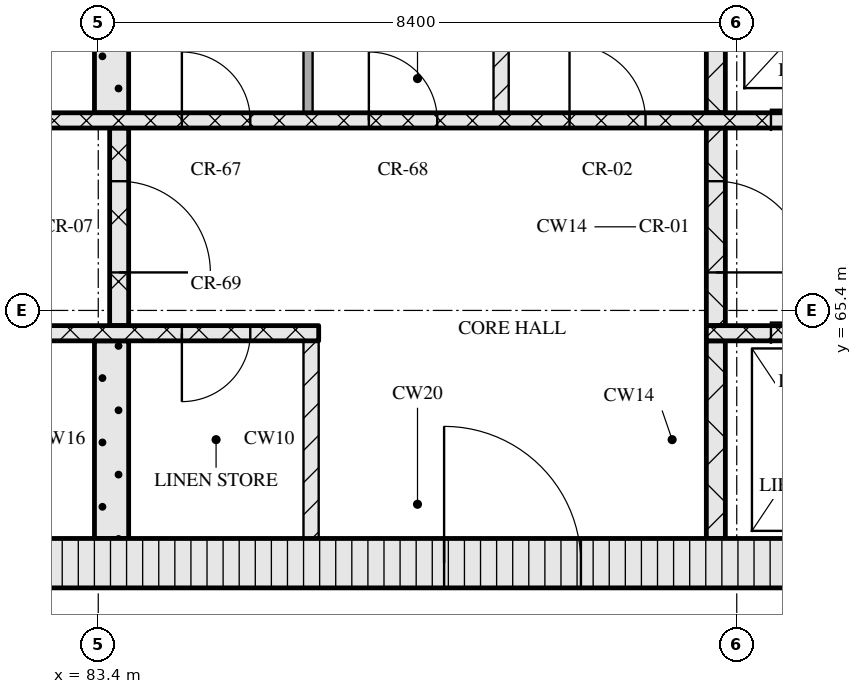
"""IFC4 building model, lengths in metres.
Left out: names, types, materials, properties, quantities, classifications, styles, units other than length and angle.
Written with IfcOpenShell. Run it as: python <this file> out.ifc"""

import sys

from ifc_helpers import new_model, si_unit, direction, frame, frame_2d, origin, place, context, subcontext, project, spatial, rectangle, extrude, element, fill, save


model = new_model("IFC4")
c1 = context("Model", 3, precision=1e-05, world=origin(), true_north=direction((0.0, 1.0)))
c2 = subcontext(c1, "Body", "Model", "MODEL_VIEW")
j1 = project(units=[si_unit("LENGTHUNIT", "METRE"), si_unit("PLANEANGLEUNIT", "RADIAN")], contexts=[c1])
p1 = place(None, origin())
s1 = spatial("IfcSite", under=j1, at=p1, CompositionType="ELEMENT")
p2 = place(p1, origin())
s2 = spatial("IfcBuilding", under=s1, at=p2, CompositionType="ELEMENT")
p3 = place(p2, frame((0.0, 0.0, 245.1)))
s3 = spatial("IfcBuildingStorey", under=s2, at=p3, CompositionType="ELEMENT", Elevation=245.1)
p4 = place(p3, frame((67.15, 62.075, 0.0), z_axis=(0.0, 0.0, 1.0), x_axis=(1.0, 0.0, 0.0)))
e1 = element("IfcWall", 1, at=p4, inside=s3, PredefinedType="SOLIDWALL", context=c2, shape_type="SweptSolid", body=[
    extrude(rectangle(XDim=40.9, YDim=0.65, at=frame_2d((20.45, 0.0))), origin(), (0.0, 0.0, 1.0), 3.32),
])
p5 = place(p4, frame((20.8, 0.0, 0.0)))
e2 = element("IfcOpeningElement", 2, at=p5, cuts=e1, PredefinedType="OPENING", context=c2, shape_type="SweptSolid", body=[
    extrude(rectangle(XDim=1.8, YDim=2.1, at=frame_2d((0.9, 1.05))), frame((0.0, 0.335, 0.0), z_axis=(0.0, -1.0, 0.0), x_axis=(1.0, 0.0, 0.0)), (0.0, 0.0, 1.0), 0.67),
])
p6 = place(p3, frame((83.575, 62.4, 0.0), z_axis=(0.0, 0.0, 1.0), x_axis=(0.0, 1.0, 0.0)))
e3 = element("IfcWall", 3, at=p6, inside=s3, PredefinedType="SOLIDWALL", context=c2, shape_type="SweptSolid", body=[
    extrude(rectangle(XDim=2.6, YDim=0.45, at=frame_2d((1.3, 0.0))), origin(), (0.0, 0.0, 1.0), 3.32),
])
p7 = place(p3, frame((86.2, 62.4, 0.0), z_axis=(0.0, 0.0, 1.0), x_axis=(0.0, 1.0, 0.0)))
e4 = element("IfcWall", 4, at=p7, inside=s3, PredefinedType="PARTITIONING", context=c2, shape_type="SweptSolid", body=[
    extrude(rectangle(XDim=2.6, YDim=0.2, at=frame_2d((1.3, 0.0))), origin(), (0.0, 0.0, 1.0), 3.32),
])
p8 = place(p3, frame((91.525, 62.4, 0.0), z_axis=(0.0, 0.0, 1.0), x_axis=(0.0, 1.0, 0.0)))
e5 = element("IfcWall", 5, at=p8, inside=s3, PredefinedType="SOLIDWALL", context=c2, shape_type="SweptSolid", body=[
    extrude(rectangle(XDim=2.6, YDim=0.25, at=frame_2d((1.3, 0.0))), origin(), (0.0, 0.0, 1.0), 3.32),
])
p9 = place(p3, frame((67.8, 65.1, 0.0), z_axis=(0.0, 0.0, 1.0), x_axis=(1.0, 0.0, 0.0)))
e6 = element("IfcWall", 6, at=p9, inside=s3, PredefinedType="SOLIDWALL", context=c2, shape_type="SweptSolid", body=[
    extrude(rectangle(XDim=18.5, YDim=0.2, at=frame_2d((9.25, 0.0))), origin(), (0.0, 0.0, 1.0), 3.32),
])
p10 = place(p9, frame((7.27, 0.0, 0.0)))
e7 = element("IfcOpeningElement", 7, at=p10, cuts=e6, PredefinedType="OPENING", context=c2, shape_type="SweptSolid", body=[
    extrude(rectangle(XDim=0.9, YDim=2.1, at=frame_2d((0.45, 1.05))), frame((0.0, 0.11, 0.0), z_axis=(0.0, -1.0, 0.0), x_axis=(1.0, 0.0, 0.0)), (0.0, 0.0, 1.0), 0.22),
])
p11 = place(p9, frame((9.65, 0.0, 0.0)))
e8 = element("IfcOpeningElement", 8, at=p11, cuts=e6, PredefinedType="OPENING", context=c2, shape_type="SweptSolid", body=[
    extrude(rectangle(XDim=0.9, YDim=2.1, at=frame_2d((0.45, 1.05))), frame((0.0, 0.11, 0.0), z_axis=(0.0, -1.0, 0.0), x_axis=(1.0, 0.0, 0.0)), (0.0, 0.0, 1.0), 0.22),
])
p12 = place(p9, frame((13.36, 0.0, 0.0)))
e9 = element("IfcOpeningElement", 9, at=p12, cuts=e6, PredefinedType="OPENING", context=c2, shape_type="SweptSolid", body=[
    extrude(rectangle(XDim=0.9, YDim=2.1, at=frame_2d((0.45, 1.05))), frame((0.0, 0.11, 0.0), z_axis=(0.0, -1.0, 0.0), x_axis=(1.0, 0.0, 0.0)), (0.0, 0.0, 1.0), 0.22),
])
p13 = place(p9, frame((16.7, 0.0, 0.0)))
e10 = element("IfcOpeningElement", 10, at=p13, cuts=e6, PredefinedType="OPENING", context=c2, shape_type="SweptSolid", body=[
    extrude(rectangle(XDim=0.9, YDim=2.1, at=frame_2d((0.45, 1.05))), frame((0.0, 0.11, 0.0), z_axis=(0.0, -1.0, 0.0), x_axis=(1.0, 0.0, 0.0)), (0.0, 0.0, 1.0), 0.22),
])
p14 = place(p3, frame((91.4, 65.1, 0.0), z_axis=(0.0, 0.0, 1.0), x_axis=(1.0, 0.0, 0.0)))
e11 = element("IfcWall", 11, at=p14, inside=s3, PredefinedType="SOLIDWALL", context=c2, shape_type="SweptSolid", body=[
    extrude(rectangle(XDim=16.0, YDim=0.2, at=frame_2d((8.0, 0.0))), origin(), (0.0, 0.0, 1.0), 3.32),
])
p15 = place(p14, frame((0.85, 0.0, 0.0)))
e12 = element("IfcOpeningElement", 12, at=p15, cuts=e11, PredefinedType="OPENING", context=c2, shape_type="SweptSolid", body=[
    extrude(rectangle(XDim=1.1, YDim=2.1, at=frame_2d((0.55, 1.05))), frame((0.0, 0.11, 0.0), z_axis=(0.0, -1.0, 0.0), x_axis=(1.0, 0.0, 0.0)), (0.0, 0.0, 1.0), 0.22),
])
p16 = place(p14, frame((3.35, 0.0, 0.0)))
e13 = element("IfcOpeningElement", 13, at=p16, cuts=e11, PredefinedType="OPENING", context=c2, shape_type="SweptSolid", body=[
    extrude(rectangle(XDim=1.1, YDim=2.1, at=frame_2d((0.55, 1.05))), frame((0.0, 0.11, 0.0), z_axis=(0.0, -1.0, 0.0), x_axis=(1.0, 0.0, 0.0)), (0.0, 0.0, 1.0), 0.22),
])
p17 = place(p14, frame((5.85, 0.0, 0.0)))
e14 = element("IfcOpeningElement", 14, at=p17, cuts=e11, PredefinedType="OPENING", context=c2, shape_type="SweptSolid", body=[
    extrude(rectangle(XDim=1.1, YDim=2.1, at=frame_2d((0.55, 1.05))), frame((0.0, 0.11, 0.0), z_axis=(0.0, -1.0, 0.0), x_axis=(1.0, 0.0, 0.0)), (0.0, 0.0, 1.0), 0.22),
])
p18 = place(p14, frame((7.83, 0.0, 0.0)))
e15 = element("IfcOpeningElement", 15, at=p18, cuts=e11, PredefinedType="OPENING", context=c2, shape_type="SweptSolid", body=[
    extrude(rectangle(XDim=0.9, YDim=2.1, at=frame_2d((0.45, 1.05))), frame((0.0, 0.11, 0.0), z_axis=(0.0, -1.0, 0.0), x_axis=(1.0, 0.0, 0.0)), (0.0, 0.0, 1.0), 0.22),
])
p19 = place(p3, frame((83.675, 65.2, 0.0), z_axis=(0.0, 0.0, 1.0), x_axis=(0.0, 1.0, 0.0)))
e16 = element("IfcWall", 16, at=p19, inside=s3, PredefinedType="SOLIDWALL", context=c2, shape_type="SweptSolid", body=[
    extrude(rectangle(XDim=2.6, YDim=0.25, at=frame_2d((1.3, 0.0))), origin(), (0.0, 0.0, 1.0), 3.32),
])
p20 = place(p19, frame((0.7, 0.0, 0.0)))
e17 = element("IfcOpeningElement", 17, at=p20, cuts=e16, PredefinedType="OPENING", context=c2, shape_type="SweptSolid", body=[
    extrude(rectangle(XDim=1.2, YDim=2.1, at=frame_2d((0.6, 1.05))), frame((0.0, 0.135, 0.0), z_axis=(0.0, -1.0, 0.0), x_axis=(1.0, 0.0, 0.0)), (0.0, 0.0, 1.0), 0.27),
])
p21 = place(p3, frame((91.525, 65.2, 0.0), z_axis=(0.0, 0.0, 1.0), x_axis=(0.0, 1.0, 0.0)))
e18 = element("IfcWall", 18, at=p21, inside=s3, PredefinedType="SOLIDWALL", context=c2, shape_type="SweptSolid", body=[
    extrude(rectangle(XDim=2.6, YDim=0.25, at=frame_2d((1.3, 0.0))), origin(), (0.0, 0.0, 1.0), 3.32),
])
p22 = place(p21, frame((0.7, 0.0, 0.0)))
e19 = element("IfcOpeningElement", 19, at=p22, cuts=e18, PredefinedType="OPENING", context=c2, shape_type="SweptSolid", body=[
    extrude(rectangle(XDim=1.2, YDim=2.1, at=frame_2d((0.6, 1.05))), frame((0.0, 0.135, 0.0), z_axis=(0.0, -1.0, 0.0), x_axis=(1.0, 0.0, 0.0)), (0.0, 0.0, 1.0), 0.27),
])
p23 = place(p3, frame((76.05, 67.9, 0.0), z_axis=(0.0, 0.0, 1.0), x_axis=(1.0, 0.0, 0.0)))
e20 = element("IfcWall", 20, at=p23, inside=s3, PredefinedType="SOLIDWALL", context=c2, shape_type="SweptSolid", body=[
    extrude(rectangle(XDim=23.1, YDim=0.2, at=frame_2d((11.55, 0.0))), origin(), (0.0, 0.0, 1.0), 3.32),
])
p24 = place(p23, frame((0.75, 0.0, 0.0)))
e21 = element("IfcOpeningElement", 21, at=p24, cuts=e20, PredefinedType="OPENING", context=c2, shape_type="SweptSolid", body=[
    extrude(rectangle(XDim=0.9, YDim=2.1, at=frame_2d((0.45, 1.05))), frame((0.0, 0.11, 0.0), z_axis=(0.0, -1.0, 0.0), x_axis=(1.0, 0.0, 0.0)), (0.0, 0.0, 1.0), 0.22),
])
p25 = place(p23, frame((3.32, 0.0, 0.0)))
e22 = element("IfcOpeningElement", 22, at=p25, cuts=e20, PredefinedType="OPENING", context=c2, shape_type="SweptSolid", body=[
    extrude(rectangle(XDim=0.9, YDim=2.1, at=frame_2d((0.45, 1.05))), frame((0.0, 0.11, 0.0), z_axis=(0.0, -1.0, 0.0), x_axis=(1.0, 0.0, 0.0)), (0.0, 0.0, 1.0), 0.22),
])
p26 = place(p23, frame((5.77, 0.0, 0.0)))
e23 = element("IfcOpeningElement", 23, at=p26, cuts=e20, PredefinedType="OPENING", context=c2, shape_type="SweptSolid", body=[
    extrude(rectangle(XDim=0.9, YDim=2.1, at=frame_2d((0.45, 1.05))), frame((0.0, 0.11, 0.0), z_axis=(0.0, -1.0, 0.0), x_axis=(1.0, 0.0, 0.0)), (0.0, 0.0, 1.0), 0.22),
])
p27 = place(p23, frame((8.45, 0.0, 0.0)))
e24 = element("IfcOpeningElement", 24, at=p27, cuts=e20, PredefinedType="OPENING", context=c2, shape_type="SweptSolid", body=[
    extrude(rectangle(XDim=0.9, YDim=2.1, at=frame_2d((0.45, 1.05))), frame((0.0, 0.11, 0.0), z_axis=(0.0, -1.0, 0.0), x_axis=(1.0, 0.0, 0.0)), (0.0, 0.0, 1.0), 0.22),
])
p28 = place(p23, frame((10.91, 0.0, 0.0)))
e25 = element("IfcOpeningElement", 25, at=p28, cuts=e20, PredefinedType="OPENING", context=c2, shape_type="SweptSolid", body=[
    extrude(rectangle(XDim=0.9, YDim=2.1, at=frame_2d((0.45, 1.05))), frame((0.0, 0.11, 0.0), z_axis=(0.0, -1.0, 0.0), x_axis=(1.0, 0.0, 0.0)), (0.0, 0.0, 1.0), 0.22),
])
p29 = place(p23, frame((13.55, 0.0, 0.0)))
e26 = element("IfcOpeningElement", 26, at=p29, cuts=e20, PredefinedType="OPENING", context=c2, shape_type="SweptSolid", body=[
    extrude(rectangle(XDim=1.0, YDim=2.1, at=frame_2d((0.5, 1.05))), frame((0.0, 0.11, 0.0), z_axis=(0.0, -1.0, 0.0), x_axis=(1.0, 0.0, 0.0)), (0.0, 0.0, 1.0), 0.22),
])
p30 = place(p23, frame((16.2, 0.0, 0.0)))
e27 = element("IfcOpeningElement", 27, at=p30, cuts=e20, PredefinedType="OPENING", context=c2, shape_type="SweptSolid", body=[
    extrude(rectangle(XDim=1.1, YDim=2.1, at=frame_2d((0.55, 1.05))), frame((0.0, 0.11, 0.0), z_axis=(0.0, -1.0, 0.0), x_axis=(1.0, 0.0, 0.0)), (0.0, 0.0, 1.0), 0.22),
])
p31 = place(p23, frame((18.7, 0.0, 0.0)))
e28 = element("IfcOpeningElement", 28, at=p31, cuts=e20, PredefinedType="OPENING", context=c2, shape_type="SweptSolid", body=[
    extrude(rectangle(XDim=1.1, YDim=2.1, at=frame_2d((0.55, 1.05))), frame((0.0, 0.11, 0.0), z_axis=(0.0, -1.0, 0.0), x_axis=(1.0, 0.0, 0.0)), (0.0, 0.0, 1.0), 0.22),
])
p32 = place(p23, frame((21.2, 0.0, 0.0)))
e29 = element("IfcOpeningElement", 29, at=p32, cuts=e20, PredefinedType="OPENING", context=c2, shape_type="SweptSolid", body=[
    extrude(rectangle(XDim=1.1, YDim=2.1, at=frame_2d((0.55, 1.05))), frame((0.0, 0.11, 0.0), z_axis=(0.0, -1.0, 0.0), x_axis=(1.0, 0.0, 0.0)), (0.0, 0.0, 1.0), 0.22),
])
p33 = place(p3, frame((83.575, 68.0, 0.0), z_axis=(0.0, 0.0, 1.0), x_axis=(0.0, 1.0, 0.0)))
e30 = element("IfcWall", 30, at=p33, inside=s3, PredefinedType="SOLIDWALL", context=c2, shape_type="SweptSolid", body=[
    extrude(rectangle(XDim=2.6, YDim=0.45, at=frame_2d((1.3, 0.0))), origin(), (0.0, 0.0, 1.0), 3.32),
])
p34 = place(p3, frame((86.16, 68.0, 0.0), z_axis=(0.0, 0.0, 1.0), x_axis=(0.0, 1.0, 0.0)))
e31 = element("IfcWall", 31, at=p34, inside=s3, PredefinedType="PARTITIONING", context=c2, shape_type="SweptSolid", body=[
    extrude(rectangle(XDim=2.6, YDim=0.12, at=frame_2d((1.3, 0.0))), origin(), (0.0, 0.0, 1.0), 3.32),
])
p35 = place(p3, frame((88.7, 68.0, 0.0), z_axis=(0.0, 0.0, 1.0), x_axis=(0.0, 1.0, 0.0)))
e32 = element("IfcWall", 32, at=p35, inside=s3, PredefinedType="PARTITIONING", context=c2, shape_type="SweptSolid", body=[
    extrude(rectangle(XDim=2.6, YDim=0.2, at=frame_2d((1.3, 0.0))), origin(), (0.0, 0.0, 1.0), 3.32),
])
p36 = place(p3, frame((91.525, 68.0, 0.0), z_axis=(0.0, 0.0, 1.0), x_axis=(0.0, 1.0, 0.0)))
e33 = element("IfcWall", 33, at=p36, inside=s3, PredefinedType="SOLIDWALL", context=c2, shape_type="SweptSolid", body=[
    extrude(rectangle(XDim=2.6, YDim=0.25, at=frame_2d((1.3, 0.0))), origin(), (0.0, 0.0, 1.0), 3.32),
])
p37 = place(p5, origin())
e34 = element("IfcDoor", 34, at=p37, inside=s3, OperationType="DOUBLE_DOOR_SINGLE_SWING", PredefinedType="DOOR", context=c2, shape_type="SweptSolid", body=[
    extrude(rectangle(XDim=1.8, YDim=2.1, at=frame_2d((0.9, 1.05))), frame((0.0, 0.025, 0.0), z_axis=(0.0, -1.0, 0.0), x_axis=(1.0, 0.0, 0.0)), (0.0, 0.0, 1.0), 0.05),
])
fill(e2, e34)
p38 = place(p13, origin())
e35 = element("IfcDoor", 35, at=p38, inside=s3, OperationType="SINGLE_SWING_RIGHT", PredefinedType="DOOR", context=c2, shape_type="SweptSolid", body=[
    extrude(rectangle(XDim=0.9, YDim=2.1, at=frame_2d((0.45, 1.05))), frame((0.0, 0.025, 0.0), z_axis=(0.0, -1.0, 0.0), x_axis=(1.0, 0.0, 0.0)), (0.0, 0.0, 1.0), 0.05),
])
fill(e10, e35)
p39 = place(p15, origin())
e36 = element("IfcDoor", 36, at=p39, inside=s3, OperationType="SLIDING_TO_LEFT", PredefinedType="DOOR", context=c2, shape_type="SweptSolid", body=[
    extrude(rectangle(XDim=1.1, YDim=2.1, at=frame_2d((0.55, 1.05))), frame((0.0, 0.025, 0.0), z_axis=(0.0, -1.0, 0.0), x_axis=(1.0, 0.0, 0.0)), (0.0, 0.0, 1.0), 0.05),
])
fill(e12, e36)
p40 = place(p20, origin())
e37 = element("IfcDoor", 37, at=p40, inside=s3, OperationType="SINGLE_SWING_RIGHT", PredefinedType="DOOR", context=c2, shape_type="SweptSolid", body=[
    extrude(rectangle(XDim=1.2, YDim=2.1, at=frame_2d((0.6, 1.05))), frame((0.0, 0.025, 0.0), z_axis=(0.0, -1.0, 0.0), x_axis=(1.0, 0.0, 0.0)), (0.0, 0.0, 1.0), 0.05),
])
fill(e17, e37)
p41 = place(p22, origin())
e38 = element("IfcDoor", 38, at=p41, inside=s3, OperationType="SINGLE_SWING_RIGHT", PredefinedType="DOOR", context=c2, shape_type="SweptSolid", body=[
    extrude(rectangle(XDim=1.2, YDim=2.1, at=frame_2d((0.6, 1.05))), frame((0.0, 0.025, 0.0), z_axis=(0.0, -1.0, 0.0), x_axis=(1.0, 0.0, 0.0)), (0.0, 0.0, 1.0), 0.05),
])
fill(e19, e38)
p42 = place(p27, origin())
e39 = element("IfcDoor", 39, at=p42, inside=s3, OperationType="SINGLE_SWING_LEFT", PredefinedType="DOOR", context=c2, shape_type="SweptSolid", body=[
    extrude(rectangle(XDim=0.9, YDim=2.1, at=frame_2d((0.45, 1.05))), frame((0.0, 0.025, 0.0), z_axis=(0.0, -1.0, 0.0), x_axis=(1.0, 0.0, 0.0)), (0.0, 0.0, 1.0), 0.05),
])
fill(e24, e39)
p43 = place(p28, origin())
e40 = element("IfcDoor", 40, at=p43, inside=s3, OperationType="SINGLE_SWING_LEFT", PredefinedType="DOOR", context=c2, shape_type="SweptSolid", body=[
    extrude(rectangle(XDim=0.9, YDim=2.1, at=frame_2d((0.45, 1.05))), frame((0.0, 0.025, 0.0), z_axis=(0.0, -1.0, 0.0), x_axis=(1.0, 0.0, 0.0)), (0.0, 0.0, 1.0), 0.05),
])
fill(e25, e40)
p44 = place(p29, origin())
e41 = element("IfcDoor", 41, at=p44, inside=s3, OperationType="SINGLE_SWING_LEFT", PredefinedType="DOOR", context=c2, shape_type="SweptSolid", body=[
    extrude(rectangle(XDim=1.0, YDim=2.1, at=frame_2d((0.5, 1.05))), frame((0.0, 0.025, 0.0), z_axis=(0.0, -1.0, 0.0), x_axis=(1.0, 0.0, 0.0)), (0.0, 0.0, 1.0), 0.05),
])
fill(e26, e41)
p45 = place(p30, origin())
e42 = element("IfcDoor", 42, at=p45, inside=s3, OperationType="SLIDING_TO_RIGHT", PredefinedType="DOOR", context=c2, shape_type="SweptSolid", body=[
    extrude(rectangle(XDim=1.1, YDim=2.1, at=frame_2d((0.55, 1.05))), frame((0.0, 0.025, 0.0), z_axis=(0.0, -1.0, 0.0), x_axis=(1.0, 0.0, 0.0)), (0.0, 0.0, 1.0), 0.05),
])
fill(e27, e42)
save(model, sys.argv[1])
